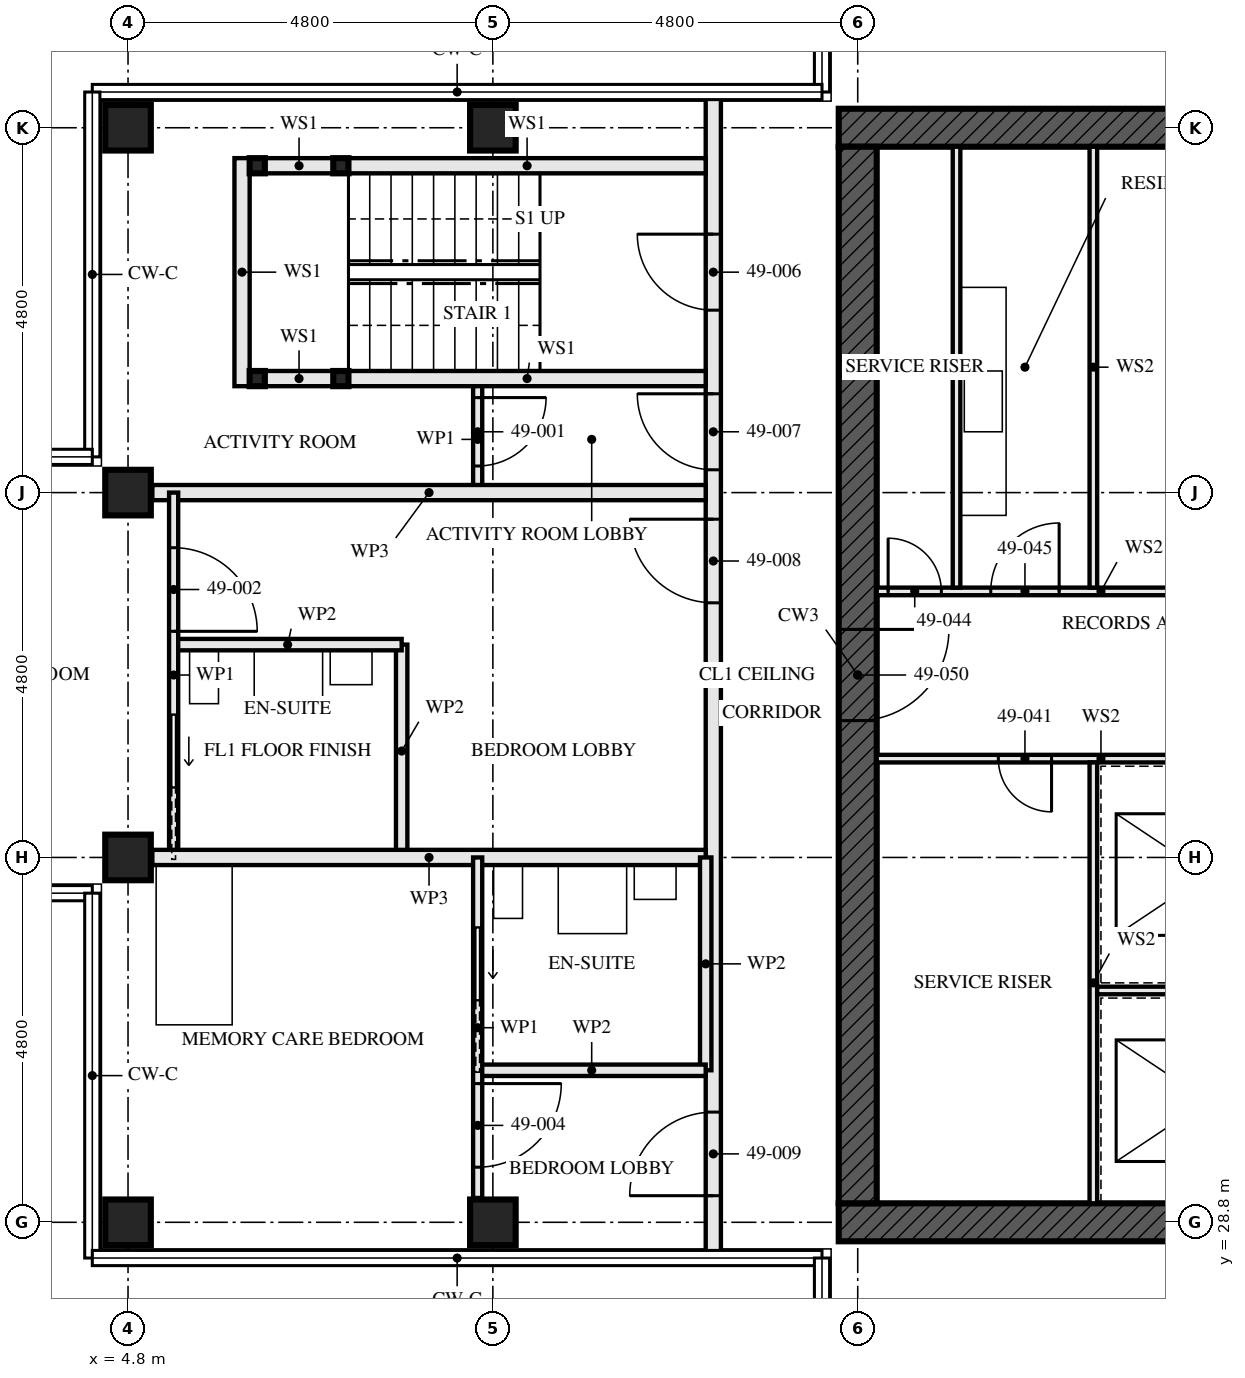
"""IFC4 building model, lengths in metres.
Left out: names, types, materials, properties, quantities, classifications, styles, units other than length and angle.
Written with IfcOpenShell. Run it as: python <this file> out.ifc"""

import sys

from ifc_helpers import new_model, si_unit, direction, frame, frame_2d, origin, origin_2d, place, context, subcontext, project, spatial, rectangle, hollow_rectangle, extrude, element, fill, save


model = new_model("IFC4")
c1 = context("Model", 3, precision=1e-05, world=origin(), true_north=direction((0.0, 1.0)))
c2 = subcontext(c1, "Body", "Model", "MODEL_VIEW")
j1 = project(units=[si_unit("LENGTHUNIT", "METRE"), si_unit("PLANEANGLEUNIT", "RADIAN")], contexts=[c1])
p1 = place(None, origin())
s1 = spatial("IfcSite", under=j1, at=p1, CompositionType="ELEMENT")
p2 = place(p1, origin())
s2 = spatial("IfcBuilding", under=s1, at=p2, CompositionType="ELEMENT")
p3 = place(p2, frame((0.0, 0.0, 179.5)))
s3 = spatial("IfcBuildingStorey", under=s2, at=p3, CompositionType="ELEMENT", Elevation=179.5)
for number, where, z_axis, x_axis in (
    (1, (4.8, 28.8, 0.0), (0.0, 0.0, 1.0), (0.0, 1.0, 0.0)),
    (2, (4.8, 33.6, 0.0), (0.0, 0.0, 1.0), (0.0, 1.0, 0.0)),
    (3, (4.8, 38.4, 0.0), (0.0, 0.0, 1.0), (0.0, 1.0, 0.0)),
    (4, (4.8, 43.2, 0.0), (0.0, 0.0, 1.0), (0.0, 1.0, 0.0)),
    (5, (9.6, 28.8, 0.0), (0.0, 0.0, 1.0), (0.0, 1.0, 0.0)),
    (6, (9.6, 43.2, 0.0), (0.0, 0.0, 1.0), (0.0, 1.0, 0.0)),
):
    element("IfcColumn", number, at=place(p3, frame(where, z_axis=z_axis, x_axis=x_axis)), inside=s3, PredefinedType="COLUMN", context=c2, shape_type="SweptSolid", body=[
        extrude(hollow_rectangle(XDim=0.6, YDim=0.6, WallThickness=0.08, at=origin_2d()), origin(), (0.0, 0.0, 1.0), 3.5),
    ])
p4 = place(p3, frame((14.15, 28.8, -0.17), z_axis=(0.0, 0.0, 1.0), x_axis=(1.0, 0.0, 0.0)))
e7 = element("IfcWall", 7, at=p4, inside=s3, PredefinedType="SHEAR", context=c2, shape_type="SweptSolid", body=[
    extrude(rectangle(XDim=14.9, YDim=0.5, at=frame_2d((7.45, 0.0))), origin(), (0.0, 0.0, 1.0), 3.5),
])
p5 = place(p4, frame((6.85, 0.0, 0.17)))
e8 = element("IfcOpeningElement", 8, at=p5, cuts=e7, PredefinedType="OPENING", context=c2, shape_type="SweptSolid", body=[
    extrude(rectangle(XDim=1.2, YDim=2.1, at=frame_2d((0.6, 1.05))), frame((0.0, 0.26, 0.0), z_axis=(0.0, -1.0, 0.0), x_axis=(1.0, 0.0, 0.0)), (0.0, 0.0, 1.0), 0.521),
])
p6 = place(p3, frame((29.05, 43.2, -0.17), z_axis=(0.0, 0.0, 1.0), x_axis=(-1.0, 0.0, 0.0)))
e9 = element("IfcWall", 9, at=p6, inside=s3, PredefinedType="SHEAR", context=c2, shape_type="SweptSolid", body=[
    extrude(rectangle(XDim=14.9, YDim=0.5, at=frame_2d((7.45, 0.0))), origin(), (0.0, 0.0, 1.0), 3.5),
])
p7 = place(p6, frame((6.85, 0.0, 0.17)))
e10 = element("IfcOpeningElement", 10, at=p7, cuts=e9, PredefinedType="OPENING", context=c2, shape_type="SweptSolid", body=[
    extrude(rectangle(XDim=1.2, YDim=2.1, at=frame_2d((0.6, 1.05))), frame((0.0, 0.26, 0.0), z_axis=(0.0, -1.0, 0.0), x_axis=(1.0, 0.0, 0.0)), (0.0, 0.0, 1.0), 0.521),
])
p8 = place(p3, frame((14.4, 42.95, -0.17), z_axis=(0.0, 0.0, 1.0), x_axis=(0.0, -1.0, 0.0)))
e11 = element("IfcWall", 11, at=p8, inside=s3, PredefinedType="SHEAR", context=c2, shape_type="SweptSolid", body=[
    extrude(rectangle(XDim=13.9, YDim=0.5, at=frame_2d((6.95, 0.0))), origin(), (0.0, 0.0, 1.0), 3.5),
])
p9 = place(p8, frame((6.35, 0.0, 0.17)))
e12 = element("IfcOpeningElement", 12, at=p9, cuts=e11, PredefinedType="OPENING", context=c2, shape_type="SweptSolid", body=[
    extrude(rectangle(XDim=1.2, YDim=2.1, at=frame_2d((0.6, 1.05))), frame((0.0, 0.26, 0.0), z_axis=(0.0, -1.0, 0.0), x_axis=(1.0, 0.0, 0.0)), (0.0, 0.0, 1.0), 0.521),
])
for number, where, z_axis, x_axis in (
    (13, (6.5, 42.7, 0.0), (0.0, 0.0, 1.0), (1.0, 0.0, 0.0)),
    (14, (6.5, 39.9, 0.0), (0.0, 0.0, 1.0), (1.0, 0.0, 0.0)),
    (15, (7.6, 42.7, 0.0), (0.0, 0.0, 1.0), (1.0, 0.0, 0.0)),
    (16, (7.6, 39.9, 0.0), (0.0, 0.0, 1.0), (1.0, 0.0, 0.0)),
):
    element("IfcColumn", number, at=place(p3, frame(where, z_axis=z_axis, x_axis=x_axis)), inside=s3, PredefinedType="COLUMN", context=c2, shape_type="SweptSolid", body=[
        extrude(hollow_rectangle(XDim=0.2, YDim=0.2, WallThickness=0.008, at=origin_2d()), origin(), (0.0, 0.0, 1.0), 3.33),
    ])
p10 = place(p3, frame((6.6, 42.7, 0.0), z_axis=(0.0, 0.0, 1.0), x_axis=(1.0, 0.0, 0.0)))
e17 = element("IfcWall", 17, at=p10, inside=s3, PredefinedType="SOLIDWALL", context=c2, shape_type="SweptSolid", body=[
    extrude(rectangle(XDim=0.9, YDim=0.2, at=frame_2d((0.45, 0.0))), origin(), (0.0, 0.0, 1.0), 2.99),
])
p11 = place(p3, frame((7.7, 42.7, 0.0), z_axis=(0.0, 0.0, 1.0), x_axis=(1.0, 0.0, 0.0)))
e18 = element("IfcWall", 18, at=p11, inside=s3, PredefinedType="SOLIDWALL", context=c2, shape_type="SweptSolid", body=[
    extrude(rectangle(XDim=4.7, YDim=0.2, at=frame_2d((2.35, 0.0))), origin(), (0.0, 0.0, 1.0), 2.99),
])
p12 = place(p3, frame((6.6, 39.9, 0.0), z_axis=(0.0, 0.0, 1.0), x_axis=(1.0, 0.0, 0.0)))
e19 = element("IfcWall", 19, at=p12, inside=s3, PredefinedType="SOLIDWALL", context=c2, shape_type="SweptSolid", body=[
    extrude(rectangle(XDim=0.9, YDim=0.2, at=frame_2d((0.45, 0.0))), origin(), (0.0, 0.0, 1.0), 2.99),
])
p13 = place(p3, frame((7.7, 39.9, 0.0), z_axis=(0.0, 0.0, 1.0), x_axis=(1.0, 0.0, 0.0)))
e20 = element("IfcWall", 20, at=p13, inside=s3, PredefinedType="SOLIDWALL", context=c2, shape_type="SweptSolid", body=[
    extrude(rectangle(XDim=4.7, YDim=0.2, at=frame_2d((2.35, 0.0))), origin(), (0.0, 0.0, 1.0), 2.99),
])
p14 = place(p3, frame((6.3, 42.8, 0.0), z_axis=(0.0, 0.0, 1.0), x_axis=(0.0, -1.0, 0.0)))
e21 = element("IfcWall", 21, at=p14, inside=s3, PredefinedType="SOLIDWALL", context=c2, shape_type="SweptSolid", body=[
    extrude(rectangle(XDim=3.0, YDim=0.2, at=frame_2d((1.5, 0.0))), origin(), (0.0, 0.0, 1.0), 3.33),
])
p15 = place(p3, frame((9.4, 39.8, 0.0), z_axis=(0.0, 0.0, 1.0), x_axis=(0.0, -1.0, 0.0)))
e22 = element("IfcWall", 22, at=p15, inside=s3, PredefinedType="PARTITIONING", context=c2, shape_type="SweptSolid", body=[
    extrude(rectangle(XDim=1.4, YDim=0.12, at=frame_2d((0.7, 0.0))), origin(), (0.0, 0.0, 1.0), 3.33),
])
p16 = place(p15, frame((0.15, 0.0, 0.0)))
e23 = element("IfcOpeningElement", 23, at=p16, cuts=e22, PredefinedType="OPENING", context=c2, shape_type="SweptSolid", body=[
    extrude(rectangle(XDim=0.9, YDim=2.1, at=frame_2d((0.45, 1.05))), frame((0.0, 0.071, 0.0), z_axis=(0.0, -1.0, 0.0), x_axis=(1.0, 0.0, 0.0)), (0.0, 0.0, 1.0), 0.141),
])
p17 = place(p3, frame((5.12, 38.4, 0.0), z_axis=(0.0, 0.0, 1.0), x_axis=(1.0, 0.0, 0.0)))
e24 = element("IfcWall", 24, at=p17, inside=s3, PredefinedType="PARTITIONING", context=c2, shape_type="SweptSolid", body=[
    extrude(rectangle(XDim=7.28, YDim=0.2, at=frame_2d((3.64, 0.0))), origin(), (0.0, 0.0, 1.0), 2.55),
])
p18 = place(p3, frame((5.4, 36.4, 0.0), z_axis=(0.0, 0.0, 1.0), x_axis=(1.0, 0.0, 0.0)))
e25 = element("IfcWall", 25, at=p18, inside=s3, PredefinedType="PARTITIONING", context=c2, shape_type="SweptSolid", body=[
    extrude(rectangle(XDim=3.0, YDim=0.15, at=frame_2d((1.5, 0.0))), origin(), (0.0, 0.0, 1.0), 3.33),
])
p19 = place(p3, frame((8.4, 36.4, 0.0), z_axis=(0.0, 0.0, 1.0), x_axis=(0.0, -1.0, 0.0)))
e26 = element("IfcWall", 26, at=p19, inside=s3, PredefinedType="PARTITIONING", context=c2, shape_type="SweptSolid", body=[
    extrude(rectangle(XDim=2.8, YDim=0.15, at=frame_2d((1.4, 0.0))), origin(), (0.0, 0.0, 1.0), 3.33),
])
p20 = place(p3, frame((5.4, 38.4, 0.0), z_axis=(0.0, 0.0, 1.0), x_axis=(0.0, -1.0, 0.0)))
e27 = element("IfcWall", 27, at=p20, inside=s3, PredefinedType="PARTITIONING", context=c2, shape_type="SweptSolid", body=[
    extrude(rectangle(XDim=4.8, YDim=0.12, at=frame_2d((2.4, 0.0))), origin(), (0.0, 0.0, 1.0), 3.33),
])
p21 = place(p20, frame((0.725, 0.0, 0.0)))
e28 = element("IfcOpeningElement", 28, at=p21, cuts=e27, PredefinedType="OPENING", context=c2, shape_type="SweptSolid", body=[
    extrude(rectangle(XDim=1.1, YDim=2.1, at=frame_2d((0.55, 1.05))), frame((0.0, 0.071, 0.0), z_axis=(0.0, -1.0, 0.0), x_axis=(1.0, 0.0, 0.0)), (0.0, 0.0, 1.0), 0.141),
])
p22 = place(p20, frame((2.925, 0.0, 0.0)))
e29 = element("IfcOpeningElement", 29, at=p22, cuts=e27, PredefinedType="OPENING", context=c2, shape_type="SweptSolid", body=[
    extrude(rectangle(XDim=0.95, YDim=2.1, at=frame_2d((0.475, 1.05))), frame((0.0, 0.071, 0.0), z_axis=(0.0, -1.0, 0.0), x_axis=(1.0, 0.0, 0.0)), (0.0, 0.0, 1.0), 0.141),
])
p23 = place(p3, frame((5.12, 33.6, 0.0), z_axis=(0.0, 0.0, 1.0), x_axis=(1.0, 0.0, 0.0)))
e30 = element("IfcWall", 30, at=p23, inside=s3, PredefinedType="PARTITIONING", context=c2, shape_type="SweptSolid", body=[
    extrude(rectangle(XDim=7.28, YDim=0.2, at=frame_2d((3.64, 0.0))), origin(), (0.0, 0.0, 1.0), 2.55),
])
p24 = place(p3, frame((9.4, 30.8, 0.0), z_axis=(0.0, 0.0, 1.0), x_axis=(1.0, 0.0, 0.0)))
e31 = element("IfcWall", 31, at=p24, inside=s3, PredefinedType="PARTITIONING", context=c2, shape_type="SweptSolid", body=[
    extrude(rectangle(XDim=3.0, YDim=0.15, at=frame_2d((1.5, 0.0))), origin(), (0.0, 0.0, 1.0), 3.33),
])
p25 = place(p3, frame((12.4, 33.6, 0.0), z_axis=(0.0, 0.0, 1.0), x_axis=(0.0, -1.0, 0.0)))
e32 = element("IfcWall", 32, at=p25, inside=s3, PredefinedType="PARTITIONING", context=c2, shape_type="SweptSolid", body=[
    extrude(rectangle(XDim=2.8, YDim=0.15, at=frame_2d((1.4, 0.0))), origin(), (0.0, 0.0, 1.0), 3.33),
])
p26 = place(p3, frame((9.4, 33.6, 0.0), z_axis=(0.0, 0.0, 1.0), x_axis=(0.0, -1.0, 0.0)))
e33 = element("IfcWall", 33, at=p26, inside=s3, PredefinedType="PARTITIONING", context=c2, shape_type="SweptSolid", body=[
    extrude(rectangle(XDim=4.48, YDim=0.12, at=frame_2d((2.24, 0.0))), origin(), (0.0, 0.0, 1.0), 3.33),
])
p27 = place(p26, frame((2.975, 0.0, 0.0)))
e34 = element("IfcOpeningElement", 34, at=p27, cuts=e33, PredefinedType="OPENING", context=c2, shape_type="SweptSolid", body=[
    extrude(rectangle(XDim=1.1, YDim=2.1, at=frame_2d((0.55, 1.05))), frame((0.0, 0.071, 0.0), z_axis=(0.0, -1.0, 0.0), x_axis=(1.0, 0.0, 0.0)), (0.0, 0.0, 1.0), 0.141),
])
p28 = place(p26, frame((0.925, 0.0, 0.0)))
e35 = element("IfcOpeningElement", 35, at=p28, cuts=e33, PredefinedType="OPENING", context=c2, shape_type="SweptSolid", body=[
    extrude(rectangle(XDim=0.95, YDim=2.1, at=frame_2d((0.475, 1.05))), frame((0.0, 0.071, 0.0), z_axis=(0.0, -1.0, 0.0), x_axis=(1.0, 0.0, 0.0)), (0.0, 0.0, 1.0), 0.141),
])
p29 = place(p3, frame((12.5, 43.65, 0.0), z_axis=(0.0, 0.0, 1.0), x_axis=(0.0, -1.0, 0.0)))
e36 = element("IfcWall", 36, at=p29, inside=s3, PredefinedType="PARTITIONING", context=c2, shape_type="SweptSolid", body=[
    extrude(rectangle(XDim=15.3, YDim=0.2, at=frame_2d((7.65, 0.0))), origin(), (0.0, 0.0, 1.0), 2.32),
])
p30 = place(p29, frame((1.85, 0.0, 0.0)))
e37 = element("IfcOpeningElement", 37, at=p30, cuts=e36, PredefinedType="OPENING", context=c2, shape_type="SweptSolid", body=[
    extrude(rectangle(XDim=1.0, YDim=2.1, at=frame_2d((0.5, 1.05))), frame((0.0, 0.111, 0.0), z_axis=(0.0, -1.0, 0.0), x_axis=(1.0, 0.0, 0.0)), (0.0, 0.0, 1.0), 0.221),
])
p31 = place(p29, frame((3.95, 0.0, 0.0)))
e38 = element("IfcOpeningElement", 38, at=p31, cuts=e36, PredefinedType="OPENING", context=c2, shape_type="SweptSolid", body=[
    extrude(rectangle(XDim=1.0, YDim=2.1, at=frame_2d((0.5, 1.05))), frame((0.0, 0.111, 0.0), z_axis=(0.0, -1.0, 0.0), x_axis=(1.0, 0.0, 0.0)), (0.0, 0.0, 1.0), 0.221),
])
p32 = place(p29, frame((5.6, 0.0, 0.0)))
e39 = element("IfcOpeningElement", 39, at=p32, cuts=e36, PredefinedType="OPENING", context=c2, shape_type="SweptSolid", body=[
    extrude(rectangle(XDim=1.1, YDim=2.1, at=frame_2d((0.55, 1.05))), frame((0.0, 0.111, 0.0), z_axis=(0.0, -1.0, 0.0), x_axis=(1.0, 0.0, 0.0)), (0.0, 0.0, 1.0), 0.221),
])
p33 = place(p29, frame((13.4, 0.0, 0.0)))
e40 = element("IfcOpeningElement", 40, at=p33, cuts=e36, PredefinedType="OPENING", context=c2, shape_type="SweptSolid", body=[
    extrude(rectangle(XDim=1.1, YDim=2.1, at=frame_2d((0.55, 1.05))), frame((0.0, 0.111, 0.0), z_axis=(0.0, -1.0, 0.0), x_axis=(1.0, 0.0, 0.0)), (0.0, 0.0, 1.0), 0.221),
])
p34 = place(p3, frame((15.7, 37.15, 0.0), z_axis=(0.0, 0.0, 1.0), x_axis=(0.0, 1.0, 0.0)))
e41 = element("IfcWall", 41, at=p34, inside=s3, PredefinedType="SOLIDWALL", context=c2, shape_type="SweptSolid", body=[
    extrude(rectangle(XDim=5.8, YDim=0.1, at=frame_2d((2.9, 0.0))), origin(), (0.0, 0.0, 1.0), 3.33),
])
p35 = place(p3, frame((14.65, 34.9, 0.0), z_axis=(0.0, 0.0, 1.0), x_axis=(1.0, 0.0, 0.0)))
e42 = element("IfcWall", 42, at=p35, inside=s3, PredefinedType="SOLIDWALL", context=c2, shape_type="SweptSolid", body=[
    extrude(rectangle(XDim=5.9, YDim=0.1, at=frame_2d((2.95, 0.0))), origin(), (0.0, 0.0, 1.0), 3.33),
])
p36 = place(p35, frame((1.6, 0.0, 0.0)))
e43 = element("IfcOpeningElement", 43, at=p36, cuts=e42, PredefinedType="OPENING", context=c2, shape_type="SweptSolid", body=[
    extrude(rectangle(XDim=0.7, YDim=2.1, at=frame_2d((0.35, 1.05))), frame((0.0, 0.061, 0.0), z_axis=(0.0, -1.0, 0.0), x_axis=(1.0, 0.0, 0.0)), (0.0, 0.0, 1.0), 0.121),
])
p37 = place(p3, frame((14.65, 37.1, 0.0), z_axis=(0.0, 0.0, 1.0), x_axis=(1.0, 0.0, 0.0)))
e44 = element("IfcWall", 44, at=p37, inside=s3, PredefinedType="SOLIDWALL", context=c2, shape_type="SweptSolid", body=[
    extrude(rectangle(XDim=5.9, YDim=0.1, at=frame_2d((2.95, 0.0))), origin(), (0.0, 0.0, 1.0), 3.33),
])
p38 = place(p37, frame((0.15, 0.0, 0.0)))
e45 = element("IfcOpeningElement", 45, at=p38, cuts=e44, PredefinedType="OPENING", context=c2, shape_type="SweptSolid", body=[
    extrude(rectangle(XDim=0.7, YDim=2.1, at=frame_2d((0.35, 1.05))), frame((0.0, 0.061, 0.0), z_axis=(0.0, -1.0, 0.0), x_axis=(1.0, 0.0, 0.0)), (0.0, 0.0, 1.0), 0.121),
])
p39 = place(p37, frame((1.5, 0.0, 0.0)))
e46 = element("IfcOpeningElement", 46, at=p39, cuts=e44, PredefinedType="OPENING", context=c2, shape_type="SweptSolid", body=[
    extrude(rectangle(XDim=0.9, YDim=2.1, at=frame_2d((0.45, 1.05))), frame((0.0, 0.061, 0.0), z_axis=(0.0, -1.0, 0.0), x_axis=(1.0, 0.0, 0.0)), (0.0, 0.0, 1.0), 0.121),
])
p40 = place(p3, frame((17.5, 29.05, 0.0), z_axis=(0.0, 0.0, 1.0), x_axis=(0.0, 1.0, 0.0)))
e47 = element("IfcWall", 47, at=p40, inside=s3, PredefinedType="SOLIDWALL", context=c2, shape_type="SweptSolid", body=[
    extrude(rectangle(XDim=5.8, YDim=0.1, at=frame_2d((2.9, 0.0))), origin(), (0.0, 0.0, 1.0), 3.33),
])
p41 = place(p3, frame((17.55, 31.85, 0.0), z_axis=(0.0, 0.0, 1.0), x_axis=(1.0, 0.0, 0.0)))
e48 = element("IfcWall", 48, at=p41, inside=s3, PredefinedType="SOLIDWALL", context=c2, shape_type="SweptSolid", body=[
    extrude(rectangle(XDim=2.9, YDim=0.1, at=frame_2d((1.45, 0.0))), origin(), (0.0, 0.0, 1.0), 3.33),
])
p42 = place(p3, frame((17.5, 37.15, 0.0), z_axis=(0.0, 0.0, 1.0), x_axis=(0.0, 1.0, 0.0)))
e49 = element("IfcWall", 49, at=p42, inside=s3, PredefinedType="SOLIDWALL", context=c2, shape_type="SweptSolid", body=[
    extrude(rectangle(XDim=5.8, YDim=0.1, at=frame_2d((2.9, 0.0))), origin(), (0.0, 0.0, 1.0), 3.33),
])
p43 = place(p16, origin())
e50 = element("IfcDoor", 50, at=p43, inside=s3, OperationType="SINGLE_SWING_RIGHT", PredefinedType="DOOR", context=c2, shape_type="SweptSolid", body=[
    extrude(rectangle(XDim=0.9, YDim=2.1, at=frame_2d((0.45, 1.05))), frame((0.0, 0.022, 0.0), z_axis=(0.0, -1.0, 0.0), x_axis=(1.0, 0.0, 0.0)), (0.0, 0.0, 1.0), 0.044),
])
fill(e23, e50)
p44 = place(p21, origin())
e51 = element("IfcDoor", 51, at=p44, inside=s3, OperationType="SINGLE_SWING_LEFT", PredefinedType="DOOR", context=c2, shape_type="SweptSolid", body=[
    extrude(rectangle(XDim=1.1, YDim=2.1, at=frame_2d((0.55, 1.05))), frame((0.0, 0.022, 0.0), z_axis=(0.0, -1.0, 0.0), x_axis=(1.0, 0.0, 0.0)), (0.0, 0.0, 1.0), 0.044),
])
fill(e28, e51)
p45 = place(p22, origin())
e52 = element("IfcDoor", 52, at=p45, inside=s3, OperationType="SLIDING_TO_LEFT", PredefinedType="DOOR", context=c2, shape_type="SweptSolid", body=[
    extrude(rectangle(XDim=0.95, YDim=2.1, at=frame_2d((0.475, 1.05))), frame((0.0, 0.022, 0.0), z_axis=(0.0, -1.0, 0.0), x_axis=(1.0, 0.0, 0.0)), (0.0, 0.0, 1.0), 0.044),
])
fill(e29, e52)
p46 = place(p27, origin())
e53 = element("IfcDoor", 53, at=p46, inside=s3, OperationType="SINGLE_SWING_RIGHT", PredefinedType="DOOR", context=c2, shape_type="SweptSolid", body=[
    extrude(rectangle(XDim=1.1, YDim=2.1, at=frame_2d((0.55, 1.05))), frame((0.0, 0.022, 0.0), z_axis=(0.0, -1.0, 0.0), x_axis=(1.0, 0.0, 0.0)), (0.0, 0.0, 1.0), 0.044),
])
fill(e34, e53)
p47 = place(p28, origin())
e54 = element("IfcDoor", 54, at=p47, inside=s3, OperationType="SLIDING_TO_LEFT", PredefinedType="DOOR", context=c2, shape_type="SweptSolid", body=[
    extrude(rectangle(XDim=0.95, YDim=2.1, at=frame_2d((0.475, 1.05))), frame((0.0, 0.022, 0.0), z_axis=(0.0, -1.0, 0.0), x_axis=(1.0, 0.0, 0.0)), (0.0, 0.0, 1.0), 0.044),
])
fill(e35, e54)
p48 = place(p30, frame((1.0, 0.0, 0.0), z_axis=(0.0, 0.0, 1.0), x_axis=(-1.0, 0.0, 0.0)))
e55 = element("IfcDoor", 55, at=p48, inside=s3, OperationType="SINGLE_SWING_LEFT", PredefinedType="DOOR", context=c2, shape_type="SweptSolid", body=[
    extrude(rectangle(XDim=1.0, YDim=2.1, at=frame_2d((0.5, 1.05))), frame((0.0, 0.032, 0.0), z_axis=(0.0, -1.0, 0.0), x_axis=(1.0, 0.0, 0.0)), (0.0, 0.0, 1.0), 0.064),
])
fill(e37, e55)
p49 = place(p31, frame((1.0, 0.0, 0.0), z_axis=(0.0, 0.0, 1.0), x_axis=(-1.0, 0.0, 0.0)))
e56 = element("IfcDoor", 56, at=p49, inside=s3, OperationType="SINGLE_SWING_LEFT", PredefinedType="DOOR", context=c2, shape_type="SweptSolid", body=[
    extrude(rectangle(XDim=1.0, YDim=2.1, at=frame_2d((0.5, 1.05))), frame((0.0, 0.027, 0.0), z_axis=(0.0, -1.0, 0.0), x_axis=(1.0, 0.0, 0.0)), (0.0, 0.0, 1.0), 0.054),
])
fill(e38, e56)
p50 = place(p32, frame((1.1, 0.0, 0.0), z_axis=(0.0, 0.0, 1.0), x_axis=(-1.0, 0.0, 0.0)))
e57 = element("IfcDoor", 57, at=p50, inside=s3, OperationType="SINGLE_SWING_LEFT", PredefinedType="DOOR", context=c2, shape_type="SweptSolid", body=[
    extrude(rectangle(XDim=1.1, YDim=2.1, at=frame_2d((0.55, 1.05))), frame((0.0, 0.027, 0.0), z_axis=(0.0, -1.0, 0.0), x_axis=(1.0, 0.0, 0.0)), (0.0, 0.0, 1.0), 0.054),
])
fill(e39, e57)
p51 = place(p33, frame((1.1, 0.0, 0.0), z_axis=(0.0, 0.0, 1.0), x_axis=(-1.0, 0.0, 0.0)))
e58 = element("IfcDoor", 58, at=p51, inside=s3, OperationType="SINGLE_SWING_RIGHT", PredefinedType="DOOR", context=c2, shape_type="SweptSolid", body=[
    extrude(rectangle(XDim=1.1, YDim=2.1, at=frame_2d((0.55, 1.05))), frame((0.0, 0.027, 0.0), z_axis=(0.0, -1.0, 0.0), x_axis=(1.0, 0.0, 0.0)), (0.0, 0.0, 1.0), 0.054),
])
fill(e40, e58)
p52 = place(p36, frame((0.7, 0.0, 0.0), z_axis=(0.0, 0.0, 1.0), x_axis=(-1.0, 0.0, 0.0)))
e59 = element("IfcDoor", 59, at=p52, inside=s3, OperationType="SINGLE_SWING_RIGHT", PredefinedType="DOOR", context=c2, shape_type="SweptSolid", body=[
    extrude(rectangle(XDim=0.7, YDim=2.1, at=frame_2d((0.35, 1.05))), frame((0.0, 0.027, 0.0), z_axis=(0.0, -1.0, 0.0), x_axis=(1.0, 0.0, 0.0)), (0.0, 0.0, 1.0), 0.054),
])
fill(e43, e59)
p53 = place(p38, origin())
e60 = element("IfcDoor", 60, at=p53, inside=s3, OperationType="SINGLE_SWING_RIGHT", PredefinedType="DOOR", context=c2, shape_type="SweptSolid", body=[
    extrude(rectangle(XDim=0.7, YDim=2.1, at=frame_2d((0.35, 1.05))), frame((0.0, 0.027, 0.0), z_axis=(0.0, -1.0, 0.0), x_axis=(1.0, 0.0, 0.0)), (0.0, 0.0, 1.0), 0.054),
])
fill(e45, e60)
p54 = place(p39, origin())
e61 = element("IfcDoor", 61, at=p54, inside=s3, OperationType="SINGLE_SWING_LEFT", PredefinedType="DOOR", context=c2, shape_type="SweptSolid", body=[
    extrude(rectangle(XDim=0.9, YDim=2.1, at=frame_2d((0.45, 1.05))), frame((0.0, 0.027, 0.0), z_axis=(0.0, -1.0, 0.0), x_axis=(1.0, 0.0, 0.0)), (0.0, 0.0, 1.0), 0.054),
])
fill(e46, e61)
p55 = place(p9, origin())
e62 = element("IfcDoor", 62, at=p55, inside=s3, OperationType="SINGLE_SWING_LEFT", PredefinedType="DOOR", context=c2, shape_type="SweptSolid", body=[
    extrude(rectangle(XDim=1.2, YDim=2.1, at=frame_2d((0.6, 1.05))), frame((0.0, 0.027, 0.0), z_axis=(0.0, -1.0, 0.0), x_axis=(1.0, 0.0, 0.0)), (0.0, 0.0, 1.0), 0.054),
])
fill(e12, e62)
save(model, sys.argv[1])
